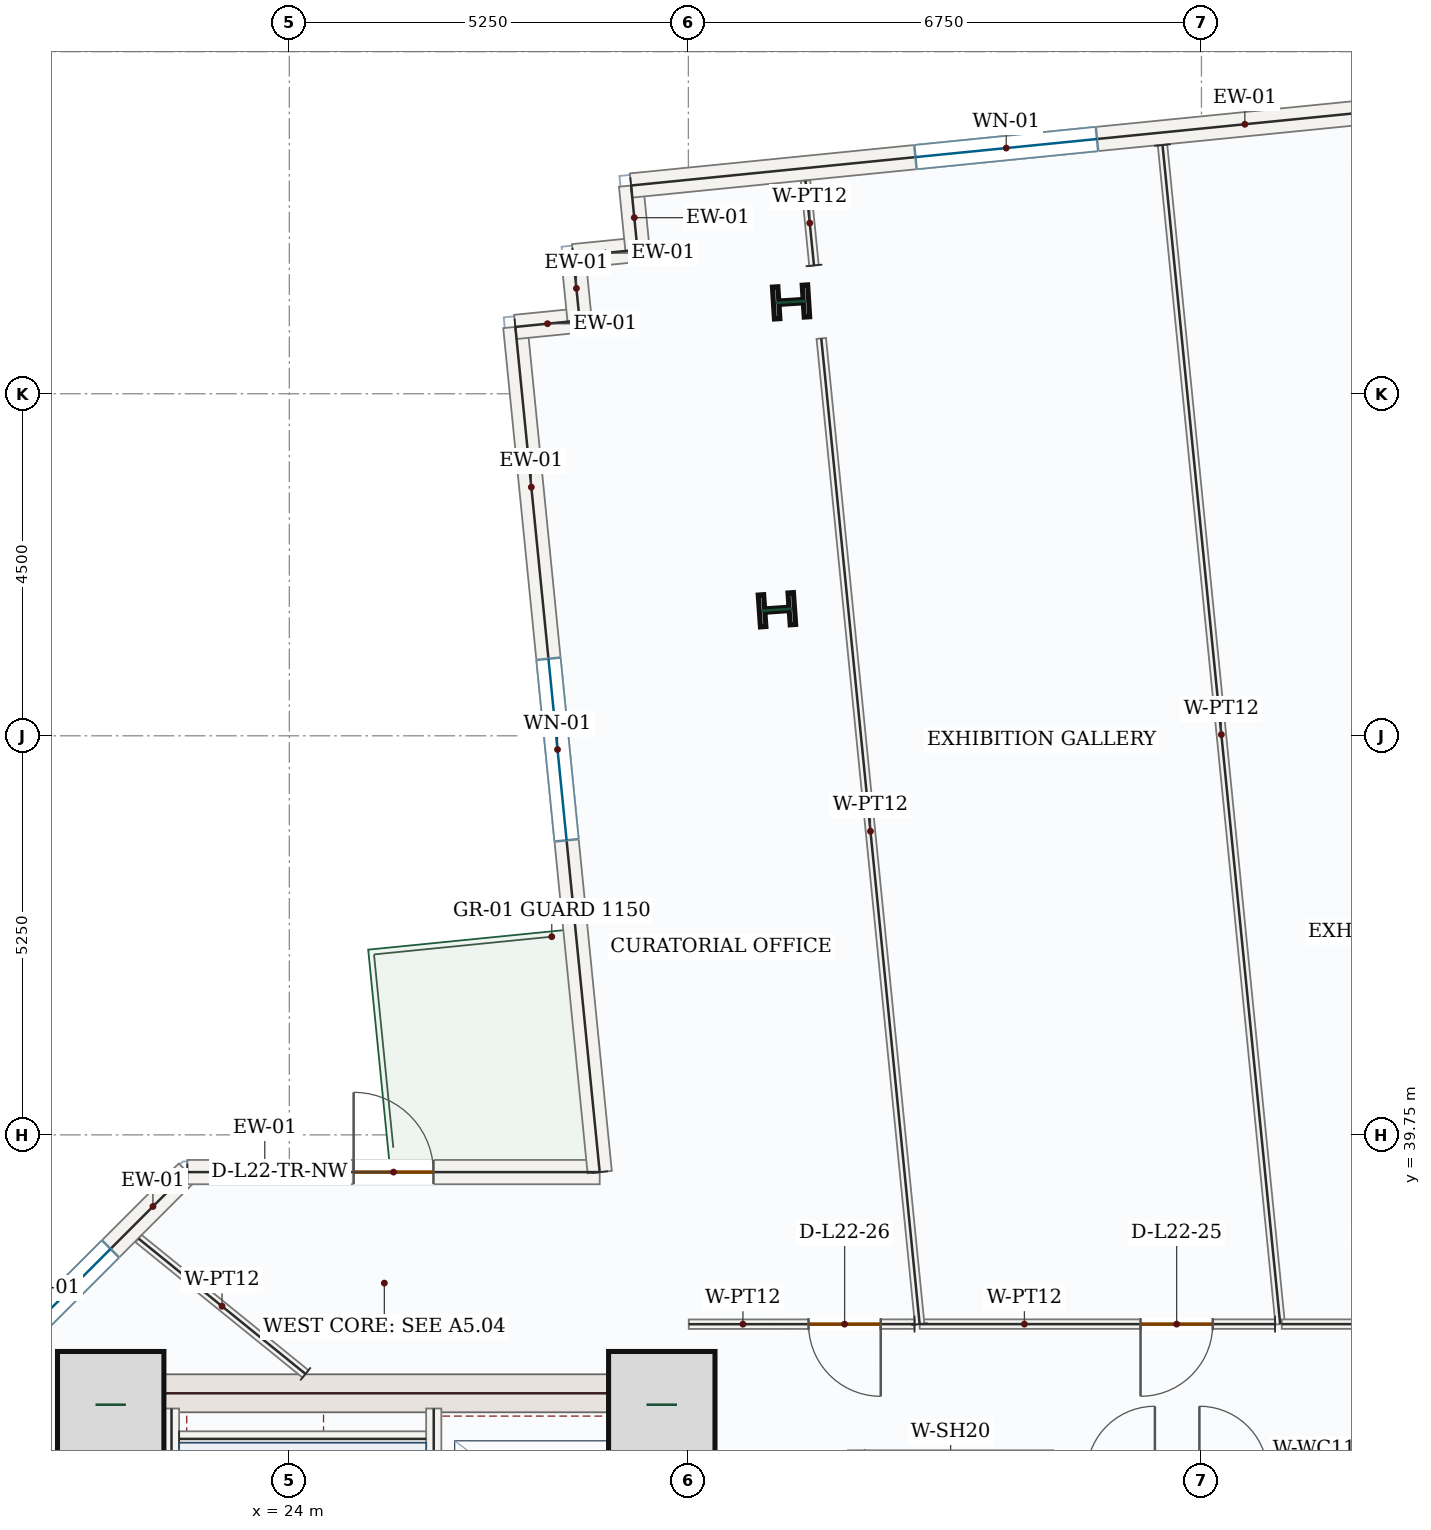
"""IFC4 building model, lengths in metres.
Left out: names, types, materials, properties, quantities, classifications, styles, units other than length and angle.
Written with IfcOpenShell. Run it as: python <this file> out.ifc"""

import sys

from ifc_helpers import new_model, si_unit, direction, frame, frame_2d, origin, origin_2d, place, context, subcontext, project, spatial, rectangle, i_section, extrude, source, transform, mapped, element, fill, save


model = new_model("IFC4")
c1 = context("Model", 3, precision=1e-05, world=origin(), true_north=direction((0.0, 1.0)))
c2 = subcontext(c1, "Body", "Model", "MODEL_VIEW")
j1 = project(units=[si_unit("LENGTHUNIT", "METRE"), si_unit("PLANEANGLEUNIT", "RADIAN")], contexts=[c1])
p1 = place(None, origin())
s1 = spatial("IfcSite", under=j1, at=p1, CompositionType="ELEMENT")
p2 = place(p1, origin())
s2 = spatial("IfcBuilding", under=s1, at=p2, CompositionType="ELEMENT")
p3 = place(p2, frame((0.0, 0.0, 100.5)))
s3 = spatial("IfcBuildingStorey", under=s2, at=p3, CompositionType="ELEMENT", Elevation=100.5)
m1 = source(origin(), c2, "Body", "SweptSolid", [
    extrude(rectangle(XDim=8.55, YDim=0.5, at=frame_2d((4.275, 0.0))), origin(), (0.0, 0.0, 1.0), 3.95),
])
p4 = place(p3, frame((21.5, 28.05, 0.0), z_axis=(0.0, 0.0, 1.0), x_axis=(0.0, 1.0, 0.0)))
e1 = element("IfcWall", 1, at=p4, inside=s3, PredefinedType="SHEAR", context=c2, shape_type="MappedRepresentation", body=[
    mapped(m1, transform((0.0, 0.0, 0.0), x_axis=(1.0, 0.0, 0.0), y_axis=(0.0, 1.0, 0.0), z_axis=(0.0, 0.0, 1.0), scale=1.0)),
])
p5 = place(p3, frame((29.0, 28.05, 0.0), z_axis=(0.0, 0.0, 1.0), x_axis=(0.0, 1.0, 0.0)))
e2 = element("IfcWall", 2, at=p5, inside=s3, PredefinedType="SHEAR", context=c2, shape_type="SweptSolid", body=[
    extrude(rectangle(XDim=8.55, YDim=0.5, at=frame_2d((4.275, 0.0))), origin(), (0.0, 0.0, 1.0), 3.95),
])
p6 = place(p5, frame((1.5, 0.0, 0.0)))
e3 = element("IfcOpeningElement", 3, at=p6, cuts=e2, PredefinedType="OPENING", context=c2, shape_type="SweptSolid", body=[
    extrude(rectangle(XDim=1.1, YDim=2.2, at=frame_2d((0.55, 1.1))), frame((0.0, 0.26, 0.0), z_axis=(0.0, -1.0, 0.0), x_axis=(1.0, 0.0, 0.0)), (0.0, 0.0, 1.0), 0.52),
])
m2 = source(origin(), c2, "Body", "SweptSolid", [
    extrude(rectangle(XDim=7.0, YDim=0.5, at=frame_2d((3.5, 0.0))), origin(), (0.0, 0.0, 1.0), 3.95),
])
p7 = place(p3, frame((21.75, 36.35, 0.0), z_axis=(0.0, 0.0, 1.0), x_axis=(1.0, 0.0, 0.0)))
e4 = element("IfcWall", 4, at=p7, inside=s3, PredefinedType="SHEAR", context=c2, shape_type="MappedRepresentation", body=[
    mapped(m2, transform((0.0, 0.0, 0.0), x_axis=(1.0, 0.0, 0.0), y_axis=(0.0, 1.0, 0.0), z_axis=(0.0, 0.0, 1.0), scale=1.0)),
])
m3 = source(origin(), c2, "Body", "SweptSolid", [
    extrude(rectangle(XDim=1.4, YDim=1.4, at=origin_2d()), origin(), (0.0, 0.0, 1.0), 4.2),
])
for number, where, z_axis, x_axis in (
    (5, (21.65, 36.2, 0.0), (0.0, 0.0, 1.0), (1.0, 0.0, 0.0)),
    (6, (28.9, 36.2, 0.0), (0.0, 0.0, 1.0), (1.0, 0.0, 0.0)),
):
    element("IfcColumn", number, at=place(p3, frame(where, z_axis=z_axis, x_axis=x_axis)), inside=s3, PredefinedType="COLUMN", context=c2, shape_type="MappedRepresentation", body=[
        mapped(m3, transform((0.0, 0.0, 0.0), x_axis=(1.0, 0.0, 0.0), y_axis=(0.0, 1.0, 0.0), z_axis=(0.0, 0.0, 1.0), scale=1.0)),
    ])
m4 = source(origin(), c2, "Body", "SweptSolid", [
    extrude(i_section(OverallWidth=0.421, OverallDepth=0.465, WebThickness=0.045, FlangeThickness=0.073, FilletRadius=0.018, at=origin_2d()), origin(), (0.0, 0.0, 1.0), 4.2),
])
for number, where, z_axis, x_axis in (
    (7, (30.415, 46.658, 0.0), (0.0, 0.0, 1.0), (-0.07, 0.998, 0.0)),
    (8, (30.601, 50.708, 0.0), (0.0, 0.0, 1.0), (-0.063, 0.998, 0.0)),
):
    element("IfcColumn", number, at=place(p3, frame(where, z_axis=z_axis, x_axis=x_axis)), inside=s3, PredefinedType="COLUMN", context=c2, shape_type="MappedRepresentation", body=[
        mapped(m4, transform((0.0, 0.0, 0.0), x_axis=(1.0, 0.0, 0.0), y_axis=(0.0, 1.0, 0.0), z_axis=(0.0, 0.0, 1.0), scale=1.0)),
    ])
p8 = place(p3, frame((18.94, 35.542, 0.0), z_axis=(0.0, 0.0, 1.0), x_axis=(0.707106781187, 0.707106781187, 0.0)))
e9 = element("IfcWall", 9, at=p8, inside=s3, PredefinedType="SOLIDWALL", context=c2, shape_type="SweptSolid", body=[
    extrude(rectangle(XDim=5.258, YDim=0.32, at=frame_2d((2.629, 0.0))), origin(), (0.0, 0.0, 1.0), 3.95),
])
p9 = place(p8, frame((1.429, 0.0, 0.85)))
e10 = element("IfcOpeningElement", 10, at=p9, cuts=e9, PredefinedType="OPENING", context=c2, shape_type="SweptSolid", body=[
    extrude(rectangle(XDim=2.4, YDim=1.8, at=frame_2d((1.2, 0.9))), frame((0.0, 0.17, 0.0), z_axis=(0.0, -1.0, 0.0), x_axis=(1.0, 0.0, 0.0)), (0.0, 0.0, 1.0), 0.34),
])
p10 = place(p3, frame((22.658, 39.26, 0.0), z_axis=(0.0, 0.0, 1.0), x_axis=(1.0, 0.0, 0.0)))
e11 = element("IfcWall", 11, at=p10, inside=s3, PredefinedType="SOLIDWALL", context=c2, shape_type="SweptSolid", body=[
    extrude(rectangle(XDim=5.425, YDim=0.32, at=frame_2d((2.713, 0.0))), origin(), (0.0, 0.0, 1.0), 3.95),
])
p11 = place(p10, frame((2.188, 0.0, 0.0)))
e12 = element("IfcOpeningElement", 12, at=p11, cuts=e11, PredefinedType="OPENING", context=c2, shape_type="SweptSolid", body=[
    extrude(rectangle(XDim=1.05, YDim=2.15, at=frame_2d((0.525, 1.075))), frame((0.0, 0.17, 0.0), z_axis=(0.0, -1.0, 0.0), x_axis=(1.0, 0.0, 0.0)), (0.0, 0.0, 1.0), 0.34),
])
p12 = place(p3, frame((28.083, 39.26, 0.0), z_axis=(0.0, 0.0, 1.0), x_axis=(-0.099322009391, 0.995055344416, 0.0)))
e13 = element("IfcWall", 13, at=p12, inside=s3, PredefinedType="SOLIDWALL", context=c2, shape_type="SweptSolid", body=[
    extrude(rectangle(XDim=11.174, YDim=0.32, at=frame_2d((5.587, 0.0))), origin(), (0.0, 0.0, 1.0), 3.95),
])
p13 = place(p12, frame((4.387, 0.0, 0.85)))
e14 = element("IfcOpeningElement", 14, at=p13, cuts=e13, PredefinedType="OPENING", context=c2, shape_type="SweptSolid", body=[
    extrude(rectangle(XDim=2.4, YDim=1.8, at=frame_2d((1.2, 0.9))), frame((0.0, 0.17, 0.0), z_axis=(0.0, -1.0, 0.0), x_axis=(1.0, 0.0, 0.0)), (0.0, 0.0, 1.0), 0.34),
])
m5 = source(origin(), c2, "Body", "SweptSolid", [
    extrude(rectangle(XDim=0.85, YDim=0.32, at=frame_2d((0.425, 0.0))), origin(), (0.0, 0.0, 1.0), 3.95),
])
p14 = place(p3, frame((26.973, 50.379, 0.0), z_axis=(0.0, 0.0, 1.0), x_axis=(0.995076929088, 0.099105525559, 0.0)))
e15 = element("IfcWall", 15, at=p14, inside=s3, PredefinedType="SOLIDWALL", context=c2, shape_type="MappedRepresentation", body=[
    mapped(m5, transform((0.0, 0.0, 0.0), x_axis=(1.0, 0.0, 0.0), y_axis=(0.0, 1.0, 0.0), z_axis=(0.0, 0.0, 1.0), scale=1.0)),
])
m6 = source(origin(), c2, "Body", "SweptSolid", [
    extrude(rectangle(XDim=0.85, YDim=0.32, at=frame_2d((0.425, 0.0))), origin(), (0.0, 0.0, 1.0), 3.95),
])
for number, where, z_axis, x_axis in (
    (16, (27.819, 50.463, 0.0), (0.0, 0.0, 1.0), (-0.099, 0.995, 0.0)),
    (17, (27.735, 51.309, 0.0), (0.0, 0.0, 1.0), (0.995, 0.099, 0.0)),
):
    element("IfcWall", number, at=place(p3, frame(where, z_axis=z_axis, x_axis=x_axis)), inside=s3, PredefinedType="SOLIDWALL", context=c2, shape_type="MappedRepresentation", body=[
        mapped(m6, transform((0.0, 0.0, 0.0), x_axis=(1.0, 0.0, 0.0), y_axis=(0.0, 1.0, 0.0), z_axis=(0.0, 0.0, 1.0), scale=1.0)),
    ])
p15 = place(p3, frame((28.581, 51.394, 0.0), z_axis=(0.0, 0.0, 1.0), x_axis=(-0.09938995433, 0.995048560111, 0.0)))
e18 = element("IfcWall", 18, at=p15, inside=s3, PredefinedType="SOLIDWALL", context=c2, shape_type="MappedRepresentation", body=[
    mapped(m5, transform((0.0, 0.0, 0.0), x_axis=(1.0, 0.0, 0.0), y_axis=(0.0, 1.0, 0.0), z_axis=(0.0, 0.0, 1.0), scale=1.0)),
])
p16 = place(p3, frame((28.496, 52.24, 0.0), z_axis=(0.0, 0.0, 1.0), x_axis=(0.995054718915, 0.09932827576, 0.0)))
e19 = element("IfcWall", 19, at=p16, inside=s3, PredefinedType="SOLIDWALL", context=c2, shape_type="SweptSolid", body=[
    extrude(rectangle(XDim=9.92, YDim=0.32, at=frame_2d((4.96, 0.0))), origin(), (0.0, 0.0, 1.0), 3.95),
])
p17 = place(p16, frame((3.76, 0.0, 0.85)))
e20 = element("IfcOpeningElement", 20, at=p17, cuts=e19, PredefinedType="OPENING", context=c2, shape_type="SweptSolid", body=[
    extrude(rectangle(XDim=2.4, YDim=1.8, at=frame_2d((1.2, 0.9))), frame((0.0, 0.17, 0.0), z_axis=(0.0, -1.0, 0.0), x_axis=(1.0, 0.0, 0.0)), (0.0, 0.0, 1.0), 0.34),
])
m7 = source(origin(), c2, "Body", "SweptSolid", [
    extrude(rectangle(XDim=7.87, YDim=0.2, at=frame_2d((3.935, 0.0))), origin(), (0.0, 0.0, 1.0), 3.95),
])
p18 = place(p3, frame((22.45, 28.28, 0.0), z_axis=(0.0, 0.0, 1.0), x_axis=(0.0, 1.0, 0.0)))
e21 = element("IfcWall", 21, at=p18, inside=s3, PredefinedType="SOLIDWALL", context=c2, shape_type="MappedRepresentation", body=[
    mapped(m7, transform((0.0, 0.0, 0.0), x_axis=(1.0, 0.0, 0.0), y_axis=(0.0, 1.0, 0.0), z_axis=(0.0, 0.0, 1.0), scale=1.0)),
])
p19 = place(p3, frame((25.9, 28.15, 0.0), z_axis=(0.0, 0.0, 1.0), x_axis=(0.0, 1.0, 0.0)))
e22 = element("IfcWall", 22, at=p19, inside=s3, PredefinedType="SOLIDWALL", context=c2, shape_type="SweptSolid", body=[
    extrude(rectangle(XDim=8.0, YDim=0.2, at=frame_2d((4.0, 0.0))), origin(), (0.0, 0.0, 1.0), 3.95),
])
p20 = place(p19, frame((0.4, 0.0, 0.0)))
e23 = element("IfcOpeningElement", 23, at=p20, cuts=e22, PredefinedType="OPENING", context=c2, shape_type="SweptSolid", body=[
    extrude(rectangle(XDim=1.05, YDim=2.15, at=frame_2d((0.525, 1.075))), frame((0.0, 0.11, 0.0), z_axis=(0.0, -1.0, 0.0), x_axis=(1.0, 0.0, 0.0)), (0.0, 0.0, 1.0), 0.22),
])
m8 = source(origin(), c2, "Body", "SweptSolid", [
    extrude(rectangle(XDim=3.25, YDim=0.2, at=frame_2d((1.625, 0.0))), origin(), (0.0, 0.0, 1.0), 3.95),
])
p21 = place(p3, frame((22.55, 35.75, 0.0), z_axis=(0.0, 0.0, 1.0), x_axis=(1.0, 0.0, 0.0)))
e24 = element("IfcWall", 24, at=p21, inside=s3, PredefinedType="SOLIDWALL", context=c2, shape_type="MappedRepresentation", body=[
    mapped(m8, transform((0.0, 0.0, 0.0), x_axis=(1.0, 0.0, 0.0), y_axis=(0.0, 1.0, 0.0), z_axis=(0.0, 0.0, 1.0), scale=1.0)),
])
m9 = source(origin(), c2, "Body", "SweptSolid", [
    extrude(rectangle(XDim=2.4, YDim=0.2, at=frame_2d((1.2, 0.0))), origin(), (0.0, 0.0, 1.0), 3.95),
])
for number, where, z_axis, x_axis in (
    (25, (31.45, 33.2, 0.0), (0.0, 0.0, 1.0), (0.0, 1.0, 0.0)),
    (26, (33.95, 33.2, 0.0), (0.0, 0.0, 1.0), (0.0, 1.0, 0.0)),
    (27, (38.05, 33.2, 0.0), (0.0, 0.0, 1.0), (0.0, 1.0, 0.0)),
):
    element("IfcWall", number, at=place(p3, frame(where, z_axis=z_axis, x_axis=x_axis)), inside=s3, PredefinedType="SOLIDWALL", context=c2, shape_type="MappedRepresentation", body=[
        mapped(m9, transform((0.0, 0.0, 0.0), x_axis=(1.0, 0.0, 0.0), y_axis=(0.0, 1.0, 0.0), z_axis=(0.0, 0.0, 1.0), scale=1.0)),
    ])
m10 = source(origin(), c2, "Body", "SweptSolid", [
    extrude(rectangle(XDim=15.589, YDim=0.125, at=frame_2d((7.794, 0.0))), origin(), (0.0, 0.0, 1.0), 3.95),
])
p22 = place(p3, frame((35.488, 52.771, 0.0), z_axis=(0.0, 0.0, 1.0), x_axis=(0.099325393126, -0.995055006661, 0.0)))
e28 = element("IfcWall", 28, at=p22, inside=s3, PredefinedType="PARTITIONING", context=c2, shape_type="MappedRepresentation", body=[
    mapped(m10, transform((0.0, 0.0, 0.0), x_axis=(1.0, 0.0, 0.0), y_axis=(0.0, 1.0, 0.0), z_axis=(0.0, 0.0, 1.0), scale=1.0)),
])
p23 = place(p3, frame((36.968, 37.26, 0.0), z_axis=(0.0, 0.0, 1.0), x_axis=(-1.0, 0.0, 0.0)))
e29 = element("IfcWall", 29, at=p23, inside=s3, PredefinedType="PARTITIONING", context=c2, shape_type="SweptSolid", body=[
    extrude(rectangle(XDim=4.676, YDim=0.125, at=frame_2d((2.338, 0.0))), origin(), (0.0, 0.0, 1.0), 3.95),
])
p24 = place(p23, frame((0.82, 0.0, 0.0)))
e30 = element("IfcOpeningElement", 30, at=p24, cuts=e29, PredefinedType="OPENING", context=c2, shape_type="SweptSolid", body=[
    extrude(rectangle(XDim=0.95, YDim=2.15, at=frame_2d((0.475, 1.075))), frame((0.0, 0.073, 0.0), z_axis=(0.0, -1.0, 0.0), x_axis=(1.0, 0.0, 0.0)), (0.0, 0.0, 1.0), 0.145),
])
m11 = source(origin(), c2, "Body", "SweptSolid", [
    extrude(rectangle(XDim=13.032, YDim=0.125, at=frame_2d((6.516, 0.0))), origin(), (0.0, 0.0, 1.0), 3.95),
])
p25 = place(p3, frame((32.293, 37.26, 0.0), z_axis=(0.0, 0.0, 1.0), x_axis=(-0.099325655293, 0.995054980491, 0.0)))
e31 = element("IfcWall", 31, at=p25, inside=s3, PredefinedType="PARTITIONING", context=c2, shape_type="MappedRepresentation", body=[
    mapped(m11, transform((0.0, 0.0, 0.0), x_axis=(1.0, 0.0, 0.0), y_axis=(0.0, 1.0, 0.0), z_axis=(0.0, 0.0, 1.0), scale=1.0)),
])
m12 = source(origin(), c2, "Body", "SweptSolid", [
    extrude(rectangle(XDim=1.121, YDim=0.125, at=frame_2d((0.56, 0.0))), origin(), (0.0, 0.0, 1.0), 3.95),
])
p26 = place(p3, frame((30.902, 51.188, 0.0), z_axis=(0.0, 0.0, 1.0), x_axis=(-0.099352712797, 0.99505227926, 0.0)))
e32 = element("IfcWall", 32, at=p26, inside=s3, PredefinedType="PARTITIONING", context=c2, shape_type="MappedRepresentation", body=[
    mapped(m12, transform((0.0, 0.0, 0.0), x_axis=(1.0, 0.0, 0.0), y_axis=(0.0, 1.0, 0.0), z_axis=(0.0, 0.0, 1.0), scale=1.0)),
])
p27 = place(p3, frame((32.225, 37.26, 0.0), z_axis=(0.0, 0.0, 1.0), x_axis=(-0.999999915533, -0.000411015173, 0.0)))
e33 = element("IfcWall", 33, at=p27, inside=s3, PredefinedType="PARTITIONING", context=c2, shape_type="SweptSolid", body=[
    extrude(rectangle(XDim=2.97, YDim=0.125, at=frame_2d((1.485, 0.0))), origin(), (0.0, 0.0, 1.0), 3.95),
])
p28 = place(p27, frame((0.444, 0.0, 0.0)))
e34 = element("IfcOpeningElement", 34, at=p28, cuts=e33, PredefinedType="OPENING", context=c2, shape_type="SweptSolid", body=[
    extrude(rectangle(XDim=0.95, YDim=2.15, at=frame_2d((0.475, 1.075))), frame((0.0, 0.073, 0.0), z_axis=(0.0, -1.0, 0.0), x_axis=(1.0, 0.0, 0.0)), (0.0, 0.0, 1.0), 0.145),
])
m13 = source(origin(), c2, "Body", "SweptSolid", [
    extrude(rectangle(XDim=2.827, YDim=0.125, at=frame_2d((1.414, 0.0))), origin(), (0.0, 0.0, 1.0), 3.95),
])
p29 = place(p3, frame((24.213, 36.605, 0.0), z_axis=(0.0, 0.0, 1.0), x_axis=(-0.776808269954, 0.62973717671, 0.0)))
e35 = element("IfcWall", 35, at=p29, inside=s3, PredefinedType="PARTITIONING", context=c2, shape_type="MappedRepresentation", body=[
    mapped(m13, transform((0.0, 0.0, 0.0), x_axis=(1.0, 0.0, 0.0), y_axis=(0.0, 1.0, 0.0), z_axis=(0.0, 0.0, 1.0), scale=1.0)),
])
p30 = place(p3, frame((42.742, 37.26, 0.0), z_axis=(0.0, 0.0, 1.0), x_axis=(-0.999999999078, 4.2935039e-05, 0.0)))
e36 = element("IfcWall", 36, at=p30, inside=s3, PredefinedType="PARTITIONING", context=c2, shape_type="SweptSolid", body=[
    extrude(rectangle(XDim=5.686, YDim=0.125, at=frame_2d((2.843, 0.0))), origin(), (0.0, 0.0, 1.0), 3.95),
])
p31 = place(p30, frame((3.694, 0.0, 0.0)))
e37 = element("IfcOpeningElement", 37, at=p31, cuts=e36, PredefinedType="OPENING", context=c2, shape_type="SweptSolid", body=[
    extrude(rectangle(XDim=0.95, YDim=2.15, at=frame_2d((0.475, 1.075))), frame((0.0, 0.073, 0.0), z_axis=(0.0, -1.0, 0.0), x_axis=(1.0, 0.0, 0.0)), (0.0, 0.0, 1.0), 0.145),
])
m14 = source(origin(), c2, "Body", "SweptSolid", [
    extrude(rectangle(XDim=2.4, YDim=1.8, at=frame_2d((1.2, 0.9))), frame((0.0, 0.03, 0.0), z_axis=(0.0, -1.0, 0.0), x_axis=(1.0, 0.0, 0.0)), (0.0, 0.0, 1.0), 0.06),
])
p32 = place(p9, origin())
e38 = element("IfcWindow", 38, at=p32, inside=s3, PartitioningType="DOUBLE_PANEL_VERTICAL", PredefinedType="WINDOW", context=c2, shape_type="MappedRepresentation", body=[
    mapped(m14, transform((0.0, 0.0, 0.0), x_axis=(1.0, 0.0, 0.0), y_axis=(0.0, 1.0, 0.0), z_axis=(0.0, 0.0, 1.0), scale=1.0)),
])
fill(e10, e38)
m15 = source(origin(), c2, "Body", "SweptSolid", [
    extrude(rectangle(XDim=1.05, YDim=2.15, at=frame_2d((0.525, 1.075))), frame((0.0, 0.025, 0.0), z_axis=(0.0, -1.0, 0.0), x_axis=(1.0, 0.0, 0.0)), (0.0, 0.0, 1.0), 0.05),
])
p33 = place(p11, origin())
e39 = element("IfcDoor", 39, at=p33, inside=s3, OperationType="SINGLE_SWING_LEFT", PredefinedType="DOOR", context=c2, shape_type="MappedRepresentation", body=[
    mapped(m15, transform((0.0, 0.0, 0.0), x_axis=(1.0, 0.0, 0.0), y_axis=(0.0, 1.0, 0.0), z_axis=(0.0, 0.0, 1.0), scale=1.0)),
])
fill(e12, e39)
p34 = place(p13, origin())
e40 = element("IfcWindow", 40, at=p34, inside=s3, PartitioningType="DOUBLE_PANEL_VERTICAL", PredefinedType="WINDOW", context=c2, shape_type="MappedRepresentation", body=[
    mapped(m14, transform((0.0, 0.0, 0.0), x_axis=(1.0, 0.0, 0.0), y_axis=(0.0, 1.0, 0.0), z_axis=(0.0, 0.0, 1.0), scale=1.0)),
])
fill(e14, e40)
p35 = place(p17, origin())
e41 = element("IfcWindow", 41, at=p35, inside=s3, PartitioningType="DOUBLE_PANEL_VERTICAL", PredefinedType="WINDOW", context=c2, shape_type="MappedRepresentation", body=[
    mapped(m14, transform((0.0, 0.0, 0.0), x_axis=(1.0, 0.0, 0.0), y_axis=(0.0, 1.0, 0.0), z_axis=(0.0, 0.0, 1.0), scale=1.0)),
])
fill(e20, e41)
m16 = source(origin(), c2, "Body", "SweptSolid", [
    extrude(rectangle(XDim=0.95, YDim=2.15, at=frame_2d((0.475, 1.075))), frame((0.0, 0.025, 0.0), z_axis=(0.0, -1.0, 0.0), x_axis=(1.0, 0.0, 0.0)), (0.0, 0.0, 1.0), 0.05),
])
p36 = place(p24, origin())
e42 = element("IfcDoor", 42, at=p36, inside=s3, OperationType="SINGLE_SWING_RIGHT", PredefinedType="DOOR", context=c2, shape_type="MappedRepresentation", body=[
    mapped(m16, transform((0.0, 0.0, 0.0), x_axis=(1.0, 0.0, 0.0), y_axis=(0.0, 1.0, 0.0), z_axis=(0.0, 0.0, 1.0), scale=1.0)),
])
fill(e30, e42)
p37 = place(p28, origin())
e43 = element("IfcDoor", 43, at=p37, inside=s3, OperationType="SINGLE_SWING_LEFT", PredefinedType="DOOR", context=c2, shape_type="MappedRepresentation", body=[
    mapped(m16, transform((0.0, 0.0, 0.0), x_axis=(1.0, 0.0, 0.0), y_axis=(0.0, 1.0, 0.0), z_axis=(0.0, 0.0, 1.0), scale=1.0)),
])
fill(e34, e43)
save(model, sys.argv[1])
